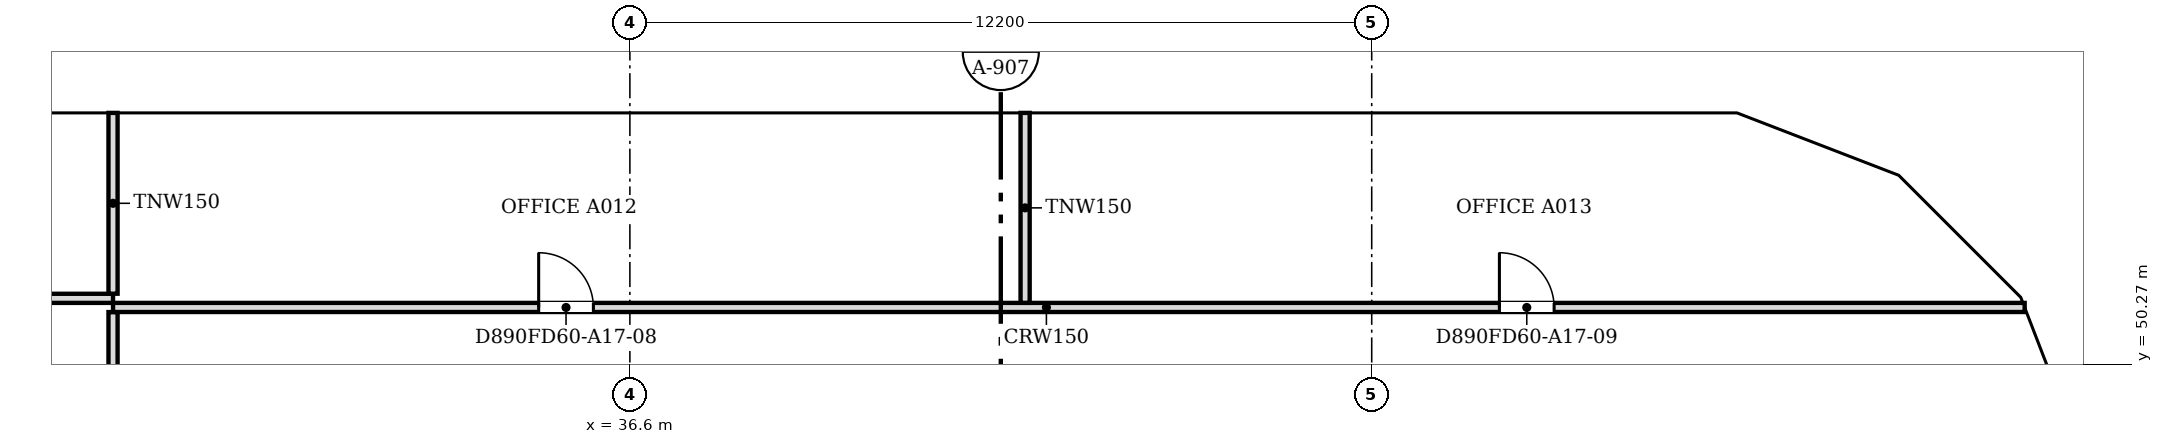
"""IFC4 building model, lengths in metres.
Left out: names, types, materials, properties, quantities, classifications, styles, units other than length and angle.
Written with IfcOpenShell. Run it as: python <this file> out.ifc"""

import sys

from ifc_helpers import new_model, si_unit, direction, frame, frame_2d, origin, place, context, subcontext, project, spatial, polyline, rectangle, outline, extrude, faceted_brep, source, transform, mapped, element, fill, save


model = new_model("IFC4")
c1 = context("Model", 3, precision=1e-05, world=origin(), true_north=direction((0.0, 1.0)))
c2 = subcontext(c1, "Body", "Model", "MODEL_VIEW")
j1 = project(units=[si_unit("LENGTHUNIT", "METRE"), si_unit("PLANEANGLEUNIT", "RADIAN")], contexts=[c1])
p1 = place(None, origin())
s1 = spatial("IfcSite", under=j1, at=p1, CompositionType="ELEMENT")
p2 = place(p1, origin())
s2 = spatial("IfcBuilding", under=s1, at=p2, CompositionType="ELEMENT")
p3 = place(p2, frame((0.0, 0.0, 189.6)))
s3 = spatial("IfcBuildingStorey", under=s2, at=p3, CompositionType="ELEMENT", Elevation=189.6)
m1 = source(origin(), c2, "Body", "Brep", [
    faceted_brep([(0.047, -0.25, 0.0), (2.997, -0.25, 3.8), (0.047, -0.25, 7.6), (0.0, -0.25, 7.541), (0.0, -0.25, 0.059), (0.093, 0.25, 7.54), (2.944, 0.25, 3.868), (2.944, 0.25, 3.732), (0.093, 0.25, 0.06), (2.997, 0.0, 3.8), (0.047, 0.0, 0.0), (0.047, 0.0, 7.6)], [[[0, 1, 2, 3, 4]], [[5, 6, 7, 8]], [[8, 7, 9, 1, 0, 10]], [[6, 5, 11, 2, 1, 9]], [[3, 2, 11]], [[10, 0, 4]], [[8, 10, 4, 3, 11, 5]], [[7, 6, 9]]]),
])
p4 = place(p3, frame((60.767, 48.71, -3.8), z_axis=(0.0, 0.0, 1.0), x_axis=(-0.359901446078, 0.932990326376, 0.0)))
e1 = element("IfcWall", 1, at=p4, inside=s3, PredefinedType="SOLIDWALL", context=c2, shape_type="MappedRepresentation", body=[
    mapped(m1, transform((0.0, 0.0, 0.0), scale=1.0)),
])
m2 = source(origin(), c2, "Body", "SweptSolid", [
    extrude(outline(polyline([(0.247, 0.665), (2.681, 3.8), (0.247, 6.935), (0.247, 0.665)])), frame((0.0, 0.26, 0.0), z_axis=(0.0, -1.0, 0.0), x_axis=(1.0, 0.0, 0.0)), (0.0, 0.0, 1.0), 0.52),
])
p5 = place(p4, origin())
e2 = element("IfcOpeningElement", 2, at=p5, cuts=e1, PredefinedType="OPENING", context=c2, shape_type="MappedRepresentation", body=[
    mapped(m2, transform((0.0, 0.0, 0.0), scale=1.0)),
])
m3 = source(origin(), c2, "Body", "Brep", [
    faceted_brep([(2.944, -0.25, 0.0), (2.997, -0.25, 0.068), (2.997, -0.25, 7.532), (2.944, -0.25, 7.6), (0.0, -0.25, 3.8), (0.053, 0.25, 3.868), (2.891, 0.25, 7.532), (2.891, 0.25, 0.068), (0.053, 0.25, 3.732), (2.944, 0.0, 0.0), (2.944, 0.0, 7.6), (0.0, 0.0, 3.8)], [[[0, 1, 2, 3, 4]], [[5, 6, 7, 8]], [[1, 0, 9]], [[10, 3, 2]], [[6, 5, 11, 4, 3, 10]], [[8, 7, 9, 0, 4, 11]], [[8, 11, 5]], [[1, 9, 7, 6, 10, 2]]]),
])
p6 = place(p3, frame((59.688, 51.506, -3.8), z_axis=(0.0, 0.0, 1.0), x_axis=(-0.707106781187, 0.707106781187, 0.0)))
e3 = element("IfcWall", 3, at=p6, inside=s3, PredefinedType="SOLIDWALL", context=c2, shape_type="MappedRepresentation", body=[
    mapped(m3, transform((0.0, 0.0, 0.0), scale=1.0)),
])
m4 = source(origin(), c2, "Body", "SweptSolid", [
    extrude(outline(polyline([(2.744, 6.934), (0.316, 3.8), (2.744, 0.666), (2.744, 6.934)])), frame((0.0, 0.26, 0.0), z_axis=(0.0, -1.0, 0.0), x_axis=(1.0, 0.0, 0.0)), (0.0, 0.0, 1.0), 0.52),
])
p7 = place(p6, origin())
e4 = element("IfcOpeningElement", 4, at=p7, cuts=e3, PredefinedType="OPENING", context=c2, shape_type="MappedRepresentation", body=[
    mapped(m4, transform((0.0, 0.0, 0.0), scale=1.0)),
])
m5 = source(origin(), c2, "Body", "Brep", [
    faceted_brep([(0.053, -0.25, 0.0), (3.003, -0.25, 3.8), (0.053, -0.25, 7.6), (0.0, -0.25, 7.531), (0.0, -0.25, 0.068), (0.106, 0.25, 7.532), (2.957, 0.25, 3.86), (2.957, 0.25, 3.74), (0.106, 0.25, 0.068), (3.003, 0.0, 3.8), (0.053, 0.0, 0.0), (0.053, 0.0, 7.6)], [[[0, 1, 2, 3, 4]], [[5, 6, 7, 8]], [[8, 7, 9, 1, 0, 10]], [[6, 5, 11, 2, 1, 9]], [[3, 2, 11]], [[10, 0, 4]], [[8, 10, 4, 3, 11, 5]], [[7, 6, 9]]]),
])
p8 = place(p3, frame((57.656, 53.569, -3.8), z_axis=(0.0, 0.0, 1.0), x_axis=(-0.933007896601, 0.359855894603, 0.0)))
e5 = element("IfcWall", 5, at=p8, inside=s3, PredefinedType="SOLIDWALL", context=c2, shape_type="MappedRepresentation", body=[
    mapped(m5, transform((0.0, 0.0, 0.0), scale=1.0)),
])
m6 = source(origin(), c2, "Body", "SweptSolid", [
    extrude(outline(polyline([(0.253, 0.665), (2.687, 3.8), (0.253, 6.935), (0.253, 0.665)])), frame((0.0, 0.26, 0.0), z_axis=(0.0, -1.0, 0.0), x_axis=(1.0, 0.0, 0.0)), (0.0, 0.0, 1.0), 0.52),
])
p9 = place(p8, origin())
e6 = element("IfcOpeningElement", 6, at=p9, cuts=e5, PredefinedType="OPENING", context=c2, shape_type="MappedRepresentation", body=[
    mapped(m6, transform((0.0, 0.0, 0.0), scale=1.0)),
])
m7 = source(origin(), c2, "Body", "Brep", [
    faceted_brep([(3.003, -0.25, 0.0), (6.053, -0.25, 3.8), (3.003, -0.25, 7.6), (0.0, -0.25, 3.8), (0.047, 0.25, 3.859), (3.003, 0.25, 7.6), (6.053, 0.25, 3.8), (3.003, 0.25, 0.0), (0.047, 0.25, 3.741), (0.0, 0.0, 3.8)], [[[0, 1, 2, 3]], [[4, 5, 6, 7, 8]], [[7, 6, 1, 0]], [[6, 5, 2, 1]], [[5, 4, 9, 3, 2]], [[8, 7, 0, 3, 9]], [[8, 9, 4]]]),
])
p10 = place(p3, frame((54.854, 54.65, -3.8), z_axis=(0.0, 0.0, 1.0), x_axis=(-1.0, 0.0, 0.0)))
e7 = element("IfcWall", 7, at=p10, inside=s3, PredefinedType="SOLIDWALL", context=c2, shape_type="MappedRepresentation", body=[
    mapped(m7, transform((0.0, 0.0, 0.0), scale=1.0)),
])
m8 = source(origin(), c2, "Body", "SweptSolid", [
    extrude(outline(polyline([(3.005, 0.401), (5.733, 3.8), (3.005, 7.199), (0.319, 3.8), (3.005, 0.401)])), frame((0.0, 0.26, 0.0), z_axis=(0.0, -1.0, 0.0), x_axis=(1.0, 0.0, 0.0)), (0.0, 0.0, 1.0), 0.52),
])
p11 = place(p10, origin())
e8 = element("IfcOpeningElement", 8, at=p11, cuts=e7, PredefinedType="OPENING", context=c2, shape_type="MappedRepresentation", body=[
    mapped(m8, transform((0.0, 0.0, 0.0), scale=1.0)),
])
m9 = source(origin(), c2, "Body", "SweptSolid", [
    extrude(outline(polyline([(3.05, 0.0), (6.1, 3.8), (3.05, 7.6), (0.0, 3.8), (3.05, 0.0)])), frame((0.0, 0.25, 0.0), z_axis=(0.0, -1.0, 0.0), x_axis=(1.0, 0.0, 0.0)), (0.0, 0.0, 1.0), 0.5),
])
p12 = place(p3, frame((48.8, 54.65, -3.8), z_axis=(0.0, 0.0, 1.0), x_axis=(-1.0, 0.0, 0.0)))
e9 = element("IfcWall", 9, at=p12, inside=s3, PredefinedType="SOLIDWALL", context=c2, shape_type="MappedRepresentation", body=[
    mapped(m9, transform((0.0, 0.0, 0.0), scale=1.0)),
])
m10 = source(origin(), c2, "Body", "SweptSolid", [
    extrude(outline(polyline([(3.05, 0.399), (5.78, 3.8), (3.05, 7.2), (0.321, 3.8), (3.05, 0.399)])), frame((0.0, 0.26, 0.0), z_axis=(0.0, -1.0, 0.0), x_axis=(1.0, 0.0, 0.0)), (0.0, 0.0, 1.0), 0.52),
])
p13 = place(p12, origin())
e10 = element("IfcOpeningElement", 10, at=p13, cuts=e9, PredefinedType="OPENING", context=c2, shape_type="MappedRepresentation", body=[
    mapped(m10, transform((0.0, 0.0, 0.0), scale=1.0)),
])
m11 = source(origin(), c2, "Body", "Brep", [
    faceted_brep([(3.05, -0.25, 0.0), (6.1, -0.25, 3.8), (6.1, -0.25, 3.8), (3.05, -0.25, 7.6), (0.0, -0.25, 3.8), (0.0, 0.25, 3.8), (3.05, 0.25, 7.6), (6.1, 0.25, 3.8), (6.1, 0.25, 3.8), (3.05, 0.25, 0.0)], [[[0, 1, 2, 3, 4]], [[5, 6, 7, 8, 9]], [[9, 8, 1, 0]], [[7, 6, 3, 2]], [[6, 5, 4, 3]], [[5, 9, 0, 4]], [[1, 8, 7, 2]]]),
])
p14 = place(p3, frame((42.7, 54.65, -3.8), z_axis=(0.0, 0.0, 1.0), x_axis=(-1.0, 0.0, 0.0)))
e11 = element("IfcWall", 11, at=p14, inside=s3, PredefinedType="SOLIDWALL", context=c2, shape_type="MappedRepresentation", body=[
    mapped(m11, transform((0.0, 0.0, 0.0), scale=1.0)),
])
p15 = place(p14, origin())
e12 = element("IfcOpeningElement", 12, at=p15, cuts=e11, PredefinedType="OPENING", context=c2, shape_type="MappedRepresentation", body=[
    mapped(m10, transform((0.0, 0.0, 0.0), scale=1.0)),
])
p16 = place(p3, frame((36.6, 54.65, -3.8), z_axis=(0.0, 0.0, 1.0), x_axis=(-1.0, 0.0, 0.0)))
e13 = element("IfcWall", 13, at=p16, inside=s3, PredefinedType="SOLIDWALL", context=c2, shape_type="MappedRepresentation", body=[
    mapped(m9, transform((0.0, 0.0, 0.0), scale=1.0)),
])
p17 = place(p16, origin())
e14 = element("IfcOpeningElement", 14, at=p17, cuts=e13, PredefinedType="OPENING", context=c2, shape_type="MappedRepresentation", body=[
    mapped(m10, transform((0.0, 0.0, 0.0), scale=1.0)),
])
p18 = place(p3, frame((30.5, 54.65, -3.8), z_axis=(0.0, 0.0, 1.0), x_axis=(-1.0, 0.0, 0.0)))
e15 = element("IfcWall", 15, at=p18, inside=s3, PredefinedType="SOLIDWALL", context=c2, shape_type="MappedRepresentation", body=[
    mapped(m9, transform((0.0, 0.0, 0.0), scale=1.0)),
])
p19 = place(p18, origin())
e16 = element("IfcOpeningElement", 16, at=p19, cuts=e15, PredefinedType="OPENING", context=c2, shape_type="MappedRepresentation", body=[
    mapped(m10, transform((0.0, 0.0, 0.0), scale=1.0)),
])
m12 = source(origin(), c2, "Body", "Brep", [
    faceted_brep([(2.95, -0.25, 0.0), (3.003, -0.25, 0.068), (3.003, -0.25, 3.8), (0.0, -0.25, 3.8), (0.047, 0.25, 3.8), (2.898, 0.25, 3.8), (2.898, 0.25, 0.068), (0.047, 0.25, 3.74), (2.95, 0.0, 0.0), (0.0, 0.0, 3.8)], [[[0, 1, 2, 3]], [[4, 5, 6, 7]], [[1, 0, 8]], [[5, 4, 9, 3, 2]], [[7, 6, 8, 0, 3, 9]], [[7, 9, 4]], [[1, 8, 6, 5, 2]]]),
])
p20 = place(p3, frame((60.75, 48.753, 0.0), z_axis=(0.0, 0.0, 1.0), x_axis=(-0.35992665181, 0.932980602862, 0.0)))
e17 = element("IfcWall", 17, at=p20, inside=s3, PredefinedType="SOLIDWALL", context=c2, shape_type="MappedRepresentation", body=[
    mapped(m12, transform((0.0, 0.0, 0.0), scale=1.0)),
])
m13 = source(origin(), c2, "Body", "SweptSolid", [
    extrude(outline(polyline([(2.75, 3.55), (0.511, 3.55), (2.75, 0.665), (2.75, 3.55)])), frame((0.0, 0.26, 0.0), z_axis=(0.0, -1.0, 0.0), x_axis=(1.0, 0.0, 0.0)), (0.0, 0.0, 1.0), 0.52),
])
p21 = place(p20, origin())
e18 = element("IfcOpeningElement", 18, at=p21, cuts=e17, PredefinedType="OPENING", context=c2, shape_type="MappedRepresentation", body=[
    mapped(m13, transform((0.0, 0.0, 0.0), scale=1.0)),
])
m14 = source(origin(), c2, "Body", "Brep", [
    faceted_brep([(0.053, -0.25, 0.0), (2.997, -0.25, 3.8), (0.0, -0.25, 3.8), (0.0, -0.25, 0.068), (0.106, 0.25, 3.8), (2.944, 0.25, 3.8), (2.944, 0.25, 3.732), (0.106, 0.25, 0.068), (2.997, 0.0, 3.8), (0.053, 0.0, 0.0)], [[[0, 1, 2, 3]], [[4, 5, 6, 7]], [[7, 6, 8, 1, 0, 9]], [[5, 4, 2, 1, 8]], [[9, 0, 3]], [[7, 9, 3, 2, 4]], [[6, 5, 8]]]),
])
p22 = place(p3, frame((59.726, 51.469, 0.0), z_axis=(0.0, 0.0, 1.0), x_axis=(-0.707106781187, 0.707106781187, 0.0)))
e19 = element("IfcWall", 19, at=p22, inside=s3, PredefinedType="SOLIDWALL", context=c2, shape_type="MappedRepresentation", body=[
    mapped(m14, transform((0.0, 0.0, 0.0), scale=1.0)),
])
m15 = source(origin(), c2, "Body", "SweptSolid", [
    extrude(outline(polyline([(0.253, 0.666), (2.487, 3.55), (0.253, 3.55), (0.253, 0.666)])), frame((0.0, 0.26, 0.0), z_axis=(0.0, -1.0, 0.0), x_axis=(1.0, 0.0, 0.0)), (0.0, 0.0, 1.0), 0.52),
])
p23 = place(p22, origin())
e20 = element("IfcOpeningElement", 20, at=p23, cuts=e19, PredefinedType="OPENING", context=c2, shape_type="MappedRepresentation", body=[
    mapped(m15, transform((0.0, 0.0, 0.0), scale=1.0)),
])
m16 = source(origin(), c2, "Body", "Brep", [
    faceted_brep([(2.95, -0.25, 0.0), (2.997, -0.25, 0.059), (2.997, -0.25, 3.8), (0.0, -0.25, 3.8), (0.053, 0.25, 3.8), (2.904, 0.25, 3.8), (2.904, 0.25, 0.06), (0.053, 0.25, 3.732), (2.95, 0.0, 0.0), (0.0, 0.0, 3.8)], [[[0, 1, 2, 3]], [[4, 5, 6, 7]], [[1, 0, 8]], [[5, 4, 9, 3, 2]], [[7, 6, 8, 0, 3, 9]], [[7, 9, 4]], [[1, 8, 6, 5, 2]]]),
])
p24 = place(p3, frame((57.606, 53.588, 0.0), z_axis=(0.0, 0.0, 1.0), x_axis=(-0.932990326376, 0.359901446078, 0.0)))
e21 = element("IfcWall", 21, at=p24, inside=s3, PredefinedType="SOLIDWALL", context=c2, shape_type="MappedRepresentation", body=[
    mapped(m16, transform((0.0, 0.0, 0.0), scale=1.0)),
])
p25 = place(p24, origin())
e22 = element("IfcOpeningElement", 22, at=p25, cuts=e21, PredefinedType="OPENING", context=c2, shape_type="MappedRepresentation", body=[
    mapped(m13, transform((0.0, 0.0, 0.0), scale=1.0)),
])
m17 = source(origin(), c2, "Body", "Brep", [
    faceted_brep([(0.047, -0.25, 0.0), (3.05, -0.25, 3.8), (0.0, -0.25, 3.8), (0.0, -0.25, 0.06), (0.093, 0.25, 3.8), (3.05, 0.25, 3.8), (0.093, 0.25, 0.059), (0.047, 0.0, 0.0)], [[[0, 1, 2, 3]], [[4, 5, 6]], [[6, 5, 1, 0, 7]], [[5, 4, 2, 1]], [[7, 0, 3]], [[6, 7, 3, 2, 4]]]),
])
p26 = place(p3, frame((54.9, 54.65, 0.0), z_axis=(0.0, 0.0, 1.0), x_axis=(-1.0, 0.0, 0.0)))
e23 = element("IfcWall", 23, at=p26, inside=s3, PredefinedType="SOLIDWALL", context=c2, shape_type="MappedRepresentation", body=[
    mapped(m17, transform((0.0, 0.0, 0.0), scale=1.0)),
])
m18 = source(origin(), c2, "Body", "SweptSolid", [
    extrude(outline(polyline([(0.247, 0.656), (2.534, 3.55), (0.247, 3.55), (0.247, 0.656)])), frame((0.0, 0.26, 0.0), z_axis=(0.0, -1.0, 0.0), x_axis=(1.0, 0.0, 0.0)), (0.0, 0.0, 1.0), 0.52),
])
p27 = place(p26, origin())
e24 = element("IfcOpeningElement", 24, at=p27, cuts=e23, PredefinedType="OPENING", context=c2, shape_type="MappedRepresentation", body=[
    mapped(m18, transform((0.0, 0.0, 0.0), scale=1.0)),
])
m19 = source(origin(), c2, "Body", "SweptSolid", [
    extrude(outline(polyline([(3.05, 0.0), (6.1, 3.8), (0.0, 3.8), (3.05, 0.0)])), frame((0.0, 0.25, 0.0), z_axis=(0.0, -1.0, 0.0), x_axis=(1.0, 0.0, 0.0)), (0.0, 0.0, 1.0), 0.5),
])
p28 = place(p3, frame((51.85, 54.65, 0.0), z_axis=(0.0, 0.0, 1.0), x_axis=(-1.0, 0.0, 0.0)))
e25 = element("IfcWall", 25, at=p28, inside=s3, PredefinedType="SOLIDWALL", context=c2, shape_type="MappedRepresentation", body=[
    mapped(m19, transform((0.0, 0.0, 0.0), scale=1.0)),
])
m20 = source(origin(), c2, "Body", "SweptSolid", [
    extrude(outline(polyline([(3.05, 0.399), (5.579, 3.55), (0.521, 3.55), (3.05, 0.399)])), frame((0.0, 0.26, 0.0), z_axis=(0.0, -1.0, 0.0), x_axis=(1.0, 0.0, 0.0)), (0.0, 0.0, 1.0), 0.52),
])
p29 = place(p28, origin())
e26 = element("IfcOpeningElement", 26, at=p29, cuts=e25, PredefinedType="OPENING", context=c2, shape_type="MappedRepresentation", body=[
    mapped(m20, transform((0.0, 0.0, 0.0), scale=1.0)),
])
p30 = place(p3, frame((45.75, 54.65, 0.0), z_axis=(0.0, 0.0, 1.0), x_axis=(-1.0, 0.0, 0.0)))
e27 = element("IfcWall", 27, at=p30, inside=s3, PredefinedType="SOLIDWALL", context=c2, shape_type="MappedRepresentation", body=[
    mapped(m19, transform((0.0, 0.0, 0.0), scale=1.0)),
])
p31 = place(p30, origin())
e28 = element("IfcOpeningElement", 28, at=p31, cuts=e27, PredefinedType="OPENING", context=c2, shape_type="MappedRepresentation", body=[
    mapped(m20, transform((0.0, 0.0, 0.0), scale=1.0)),
])
m21 = source(origin(), c2, "Body", "Brep", [
    faceted_brep([(3.05, -0.25, 0.0), (6.1, -0.25, 3.8), (6.1, -0.25, 3.8), (0.0, -0.25, 3.8), (0.0, 0.25, 3.8), (6.1, 0.25, 3.8), (6.1, 0.25, 3.8), (3.05, 0.25, 0.0)], [[[0, 1, 2, 3]], [[4, 5, 6, 7]], [[7, 6, 1, 0]], [[5, 4, 3, 2]], [[4, 7, 0, 3]], [[1, 6, 5, 2]]]),
])
p32 = place(p3, frame((39.65, 54.65, 0.0), z_axis=(0.0, 0.0, 1.0), x_axis=(-1.0, 0.0, 0.0)))
e29 = element("IfcWall", 29, at=p32, inside=s3, PredefinedType="SOLIDWALL", context=c2, shape_type="MappedRepresentation", body=[
    mapped(m21, transform((0.0, 0.0, 0.0), scale=1.0)),
])
p33 = place(p32, origin())
e30 = element("IfcOpeningElement", 30, at=p33, cuts=e29, PredefinedType="OPENING", context=c2, shape_type="MappedRepresentation", body=[
    mapped(m20, transform((0.0, 0.0, 0.0), scale=1.0)),
])
p34 = place(p3, frame((33.55, 54.65, 0.0), z_axis=(0.0, 0.0, 1.0), x_axis=(-1.0, 0.0, 0.0)))
e31 = element("IfcWall", 31, at=p34, inside=s3, PredefinedType="SOLIDWALL", context=c2, shape_type="MappedRepresentation", body=[
    mapped(m19, transform((0.0, 0.0, 0.0), scale=1.0)),
])
p35 = place(p34, origin())
e32 = element("IfcOpeningElement", 32, at=p35, cuts=e31, PredefinedType="OPENING", context=c2, shape_type="MappedRepresentation", body=[
    mapped(m20, transform((0.0, 0.0, 0.0), scale=1.0)),
])
p36 = place(p3, frame((27.45, 54.65, 0.0), z_axis=(0.0, 0.0, 1.0), x_axis=(-1.0, 0.0, 0.0)))
e33 = element("IfcWall", 33, at=p36, inside=s3, PredefinedType="SOLIDWALL", context=c2, shape_type="MappedRepresentation", body=[
    mapped(m21, transform((0.0, 0.0, 0.0), scale=1.0)),
])
p37 = place(p36, origin())
e34 = element("IfcOpeningElement", 34, at=p37, cuts=e33, PredefinedType="OPENING", context=c2, shape_type="MappedRepresentation", body=[
    mapped(m20, transform((0.0, 0.0, 0.0), scale=1.0)),
])
p38 = place(p3, frame((28.1, 47.776, 0.0), z_axis=(0.0, 0.0, 1.0), x_axis=(0.0, 1.0, 0.0)))
e35 = element("IfcWall", 35, at=p38, inside=s3, PredefinedType="PARTITIONING", context=c2, shape_type="SweptSolid", body=[
    extrude(rectangle(XDim=3.348, YDim=0.15, at=frame_2d((1.674, 0.0))), origin(), (0.0, 0.0, 1.0), 2.947),
])
p39 = place(p3, frame((28.1, 51.2, 0.0), z_axis=(0.0, 0.0, 1.0), x_axis=(1.0, 0.0, 0.0)))
e36 = element("IfcWall", 36, at=p39, inside=s3, PredefinedType="PARTITIONING", context=c2, shape_type="SweptSolid", body=[
    extrude(rectangle(XDim=31.438, YDim=0.15, at=frame_2d((15.719, 0.0))), origin(), (0.0, 0.0, 1.0), 2.947),
])
m22 = source(origin(), c2, "Body", "SweptSolid", [
    extrude(rectangle(XDim=0.9, YDim=2.1, at=frame_2d((0.45, 1.05))), frame((0.0, 0.085, 0.0), z_axis=(0.0, -1.0, 0.0), x_axis=(1.0, 0.0, 0.0)), (0.0, 0.0, 1.0), 0.17),
])
p40 = place(p39, frame((7.0, 0.0, 0.0)))
e37 = element("IfcOpeningElement", 37, at=p40, cuts=e36, PredefinedType="OPENING", context=c2, shape_type="MappedRepresentation", body=[
    mapped(m22, transform((0.0, 0.0, 0.0), scale=1.0)),
])
p41 = place(p39, frame((22.8, 0.0, 0.0)))
e38 = element("IfcOpeningElement", 38, at=p41, cuts=e36, PredefinedType="OPENING", context=c2, shape_type="MappedRepresentation", body=[
    mapped(m22, transform((0.0, 0.0, 0.0), scale=1.0)),
])
p42 = place(p3, frame((43.1, 51.276, 0.0), z_axis=(0.0, 0.0, 1.0), x_axis=(0.0, 1.0, 0.0)))
e39 = element("IfcWall", 39, at=p42, inside=s3, PredefinedType="PARTITIONING", context=c2, shape_type="SweptSolid", body=[
    extrude(rectangle(XDim=3.124, YDim=0.15, at=frame_2d((1.562, 0.0))), origin(), (0.0, 0.0, 1.0), 2.947),
])
p43 = place(p3, frame((19.7, 51.35, 0.0), z_axis=(0.0, 0.0, 1.0), x_axis=(1.0, 0.0, 0.0)))
e40 = element("IfcWall", 40, at=p43, inside=s3, PredefinedType="PARTITIONING", context=c2, shape_type="SweptSolid", body=[
    extrude(rectangle(XDim=8.4, YDim=0.15, at=frame_2d((4.2, 0.0))), origin(), (0.0, 0.0, 1.0), 2.947),
])
p44 = place(p43, frame((3.7, 0.0, 0.0)))
e41 = element("IfcOpeningElement", 41, at=p44, cuts=e40, PredefinedType="OPENING", context=c2, shape_type="MappedRepresentation", body=[
    mapped(m22, transform((0.0, 0.0, 0.0), scale=1.0)),
])
p45 = place(p3, frame((28.1, 51.426, 0.0), z_axis=(0.0, 0.0, 1.0), x_axis=(0.0, 1.0, 0.0)))
e42 = element("IfcWall", 42, at=p45, inside=s3, PredefinedType="PARTITIONING", context=c2, shape_type="SweptSolid", body=[
    extrude(rectangle(XDim=2.974, YDim=0.15, at=frame_2d((1.487, 0.0))), origin(), (0.0, 0.0, 1.0), 2.947),
])
m23 = source(origin(), c2, "Body", "SweptSolid", [
    extrude(rectangle(XDim=0.9, YDim=2.1, at=frame_2d((0.45, 1.05))), frame((0.0, 0.025, 0.0), z_axis=(0.0, -1.0, 0.0), x_axis=(1.0, 0.0, 0.0)), (0.0, 0.0, 1.0), 0.05),
])
p46 = place(p40, origin())
e43 = element("IfcDoor", 43, at=p46, inside=s3, OperationType="SINGLE_SWING_LEFT", PredefinedType="DOOR", context=c2, shape_type="MappedRepresentation", body=[
    mapped(m23, transform((0.0, 0.0, 0.0), scale=1.0)),
])
fill(e37, e43)
p47 = place(p41, origin())
e44 = element("IfcDoor", 44, at=p47, inside=s3, OperationType="SINGLE_SWING_LEFT", PredefinedType="DOOR", context=c2, shape_type="MappedRepresentation", body=[
    mapped(m23, transform((0.0, 0.0, 0.0), scale=1.0)),
])
fill(e38, e44)
save(model, sys.argv[1])
